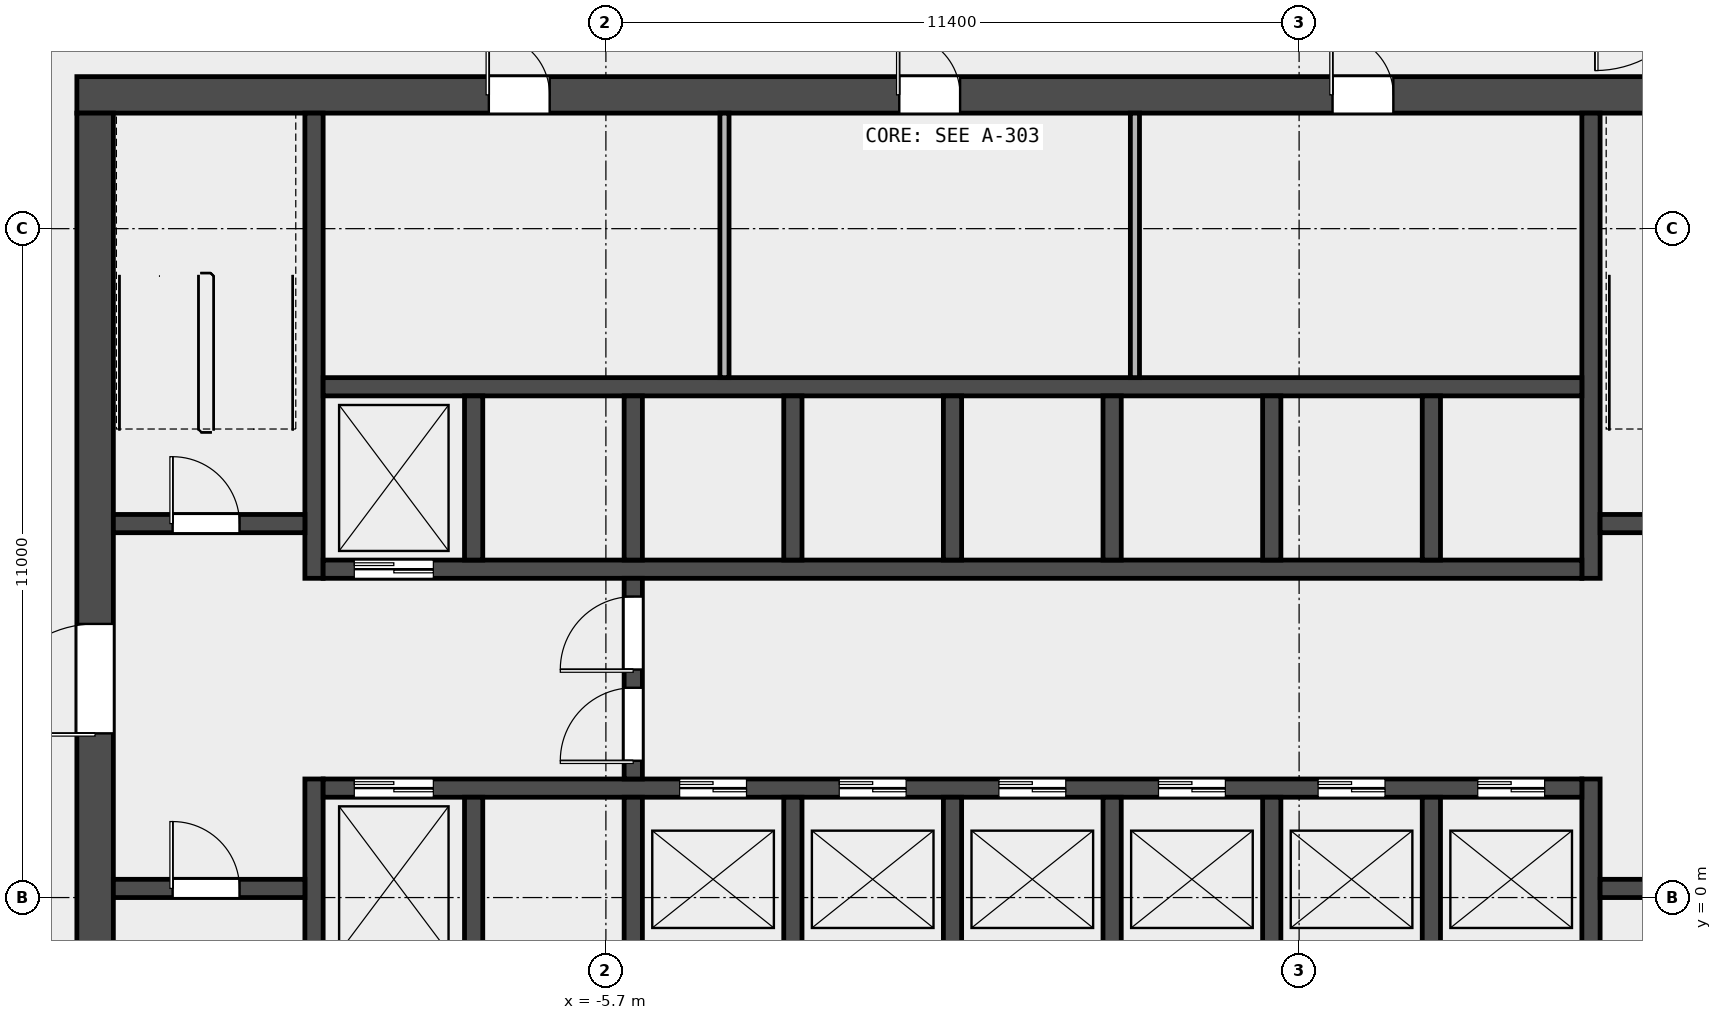
"""IFC4 building model, lengths in metres.
Left out: names, types, materials, properties, quantities, classifications, styles, units other than length and angle.
Written with IfcOpenShell. Run it as: python <this file> out.ifc"""

import sys

from ifc_helpers import new_model, si_unit, direction, frame, frame_2d, origin, place, context, subcontext, project, spatial, rectangle, extrude, element, fill, save


model = new_model("IFC4")
c1 = context("Model", 3, precision=1e-05, world=origin(), true_north=direction((0.0, 1.0)))
c2 = subcontext(c1, "Body", "Model", "MODEL_VIEW")
j1 = project(units=[si_unit("LENGTHUNIT", "METRE"), si_unit("PLANEANGLEUNIT", "RADIAN")], contexts=[c1])
p1 = place(None, origin())
s1 = spatial("IfcSite", under=j1, at=p1, CompositionType="ELEMENT")
p2 = place(p1, origin())
s2 = spatial("IfcBuilding", under=s1, at=p2, CompositionType="ELEMENT")
p3 = place(p2, frame((0.0, 0.0, 20.0)))
s3 = spatial("IfcBuildingStorey", under=s2, at=p3, CompositionType="ELEMENT", Elevation=20.0)
p4 = place(p3, frame((-14.4, 13.2, 0.0), z_axis=(0.0, 0.0, 1.0), x_axis=(1.0, 0.0, 0.0)))
e1 = element("IfcWall", 1, at=p4, inside=s3, PredefinedType="SHEAR", context=c2, shape_type="SweptSolid", body=[
    extrude(rectangle(XDim=28.8, YDim=0.6, at=frame_2d((14.4, 0.0))), origin(), (0.0, 0.0, 1.0), 5.2),
])
p5 = place(p4, frame((6.775, 0.0, 0.0)))
e2 = element("IfcOpeningElement", 2, at=p5, cuts=e1, PredefinedType="OPENING", context=c2, shape_type="SweptSolid", body=[
    extrude(rectangle(XDim=1.0, YDim=2.1, at=frame_2d((0.5, 1.05))), frame((0.0, 0.312, 0.0), z_axis=(0.0, -1.0, 0.0), x_axis=(1.0, 0.0, 0.0)), (0.0, 0.0, 1.0), 0.624),
])
p6 = place(p4, frame((13.525, 0.0, 0.0)))
e3 = element("IfcOpeningElement", 3, at=p6, cuts=e1, PredefinedType="OPENING", context=c2, shape_type="SweptSolid", body=[
    extrude(rectangle(XDim=1.0, YDim=2.1, at=frame_2d((0.5, 1.05))), frame((0.0, 0.312, 0.0), z_axis=(0.0, -1.0, 0.0), x_axis=(1.0, 0.0, 0.0)), (0.0, 0.0, 1.0), 0.624),
])
p7 = place(p4, frame((20.65, 0.0, 0.0)))
e4 = element("IfcOpeningElement", 4, at=p7, cuts=e1, PredefinedType="OPENING", context=c2, shape_type="SweptSolid", body=[
    extrude(rectangle(XDim=1.0, YDim=2.1, at=frame_2d((0.5, 1.05))), frame((0.0, 0.312, 0.0), z_axis=(0.0, -1.0, 0.0), x_axis=(1.0, 0.0, 0.0)), (0.0, 0.0, 1.0), 0.624),
])
p8 = place(p3, frame((-14.1, -6.6, 0.0), z_axis=(0.0, 0.0, 1.0), x_axis=(0.0, 1.0, 0.0)))
e5 = element("IfcWall", 5, at=p8, inside=s3, PredefinedType="SHEAR", context=c2, shape_type="SweptSolid", body=[
    extrude(rectangle(XDim=19.5, YDim=0.6, at=frame_2d((9.75, 0.0))), origin(), (0.0, 0.0, 1.0), 5.2),
])
p9 = place(p8, frame((9.3, 0.0, 0.0)))
e6 = element("IfcOpeningElement", 6, at=p9, cuts=e5, PredefinedType="OPENING", context=c2, shape_type="SweptSolid", body=[
    extrude(rectangle(XDim=1.8, YDim=2.1, at=frame_2d((0.9, 1.05))), frame((0.0, 0.312, 0.0), z_axis=(0.0, -1.0, 0.0), x_axis=(1.0, 0.0, 0.0)), (0.0, 0.0, 1.0), 0.624),
])
p10 = place(p3, frame((-10.5, -6.6, 0.0), z_axis=(0.0, 0.0, 1.0), x_axis=(0.0, 1.0, 0.0)))
e7 = element("IfcWall", 7, at=p10, inside=s3, PredefinedType="SHEAR", context=c2, shape_type="SweptSolid", body=[
    extrude(rectangle(XDim=8.55, YDim=0.3, at=frame_2d((4.275, 0.0))), origin(), (0.0, 0.0, 1.0), 5.2),
])
p11 = place(p3, frame((-10.5, 5.25, 0.0), z_axis=(0.0, 0.0, 1.0), x_axis=(0.0, 1.0, 0.0)))
e8 = element("IfcWall", 8, at=p11, inside=s3, PredefinedType="SHEAR", context=c2, shape_type="SweptSolid", body=[
    extrude(rectangle(XDim=7.65, YDim=0.3, at=frame_2d((3.825, 0.0))), origin(), (0.0, 0.0, 1.0), 5.2),
])
p12 = place(p3, frame((10.5, -6.6, 0.0), z_axis=(0.0, 0.0, 1.0), x_axis=(0.0, 1.0, 0.0)))
e9 = element("IfcWall", 9, at=p12, inside=s3, PredefinedType="SHEAR", context=c2, shape_type="SweptSolid", body=[
    extrude(rectangle(XDim=8.55, YDim=0.3, at=frame_2d((4.275, 0.0))), origin(), (0.0, 0.0, 1.0), 5.2),
])
p13 = place(p3, frame((10.5, 5.25, 0.0), z_axis=(0.0, 0.0, 1.0), x_axis=(0.0, 1.0, 0.0)))
e10 = element("IfcWall", 10, at=p13, inside=s3, PredefinedType="SHEAR", context=c2, shape_type="SweptSolid", body=[
    extrude(rectangle(XDim=7.65, YDim=0.3, at=frame_2d((3.825, 0.0))), origin(), (0.0, 0.0, 1.0), 5.2),
])
p14 = place(p3, frame((-13.8, 0.15, 0.0), z_axis=(0.0, 0.0, 1.0), x_axis=(1.0, 0.0, 0.0)))
e11 = element("IfcWall", 11, at=p14, inside=s3, PredefinedType="SOLIDWALL", context=c2, shape_type="SweptSolid", body=[
    extrude(rectangle(XDim=3.15, YDim=0.3, at=frame_2d((1.575, 0.0))), origin(), (0.0, 0.0, 1.0), 5.2),
])
p15 = place(p14, frame((0.975, 0.0, 0.0)))
e12 = element("IfcOpeningElement", 12, at=p15, cuts=e11, PredefinedType="OPENING", context=c2, shape_type="SweptSolid", body=[
    extrude(rectangle(XDim=1.1, YDim=2.1, at=frame_2d((0.55, 1.05))), frame((0.0, 0.162, 0.0), z_axis=(0.0, -1.0, 0.0), x_axis=(1.0, 0.0, 0.0)), (0.0, 0.0, 1.0), 0.324),
])
p16 = place(p3, frame((-13.8, 6.15, 0.0), z_axis=(0.0, 0.0, 1.0), x_axis=(1.0, 0.0, 0.0)))
e13 = element("IfcWall", 13, at=p16, inside=s3, PredefinedType="SOLIDWALL", context=c2, shape_type="SweptSolid", body=[
    extrude(rectangle(XDim=3.15, YDim=0.3, at=frame_2d((1.575, 0.0))), origin(), (0.0, 0.0, 1.0), 5.2),
])
p17 = place(p16, frame((0.975, 0.0, 0.0)))
e14 = element("IfcOpeningElement", 14, at=p17, cuts=e13, PredefinedType="OPENING", context=c2, shape_type="SweptSolid", body=[
    extrude(rectangle(XDim=1.1, YDim=2.1, at=frame_2d((0.55, 1.05))), frame((0.0, 0.162, 0.0), z_axis=(0.0, -1.0, 0.0), x_axis=(1.0, 0.0, 0.0)), (0.0, 0.0, 1.0), 0.324),
])
p18 = place(p3, frame((10.65, 0.15, 0.0), z_axis=(0.0, 0.0, 1.0), x_axis=(1.0, 0.0, 0.0)))
e15 = element("IfcWall", 15, at=p18, inside=s3, PredefinedType="SOLIDWALL", context=c2, shape_type="SweptSolid", body=[
    extrude(rectangle(XDim=3.15, YDim=0.3, at=frame_2d((1.575, 0.0))), origin(), (0.0, 0.0, 1.0), 5.2),
])
p19 = place(p18, frame((1.025, 0.0, 0.0)))
e16 = element("IfcOpeningElement", 16, at=p19, cuts=e15, PredefinedType="OPENING", context=c2, shape_type="SweptSolid", body=[
    extrude(rectangle(XDim=1.1, YDim=2.1, at=frame_2d((0.55, 1.05))), frame((0.0, 0.162, 0.0), z_axis=(0.0, -1.0, 0.0), x_axis=(1.0, 0.0, 0.0)), (0.0, 0.0, 1.0), 0.324),
])
p20 = place(p3, frame((10.65, 6.15, 0.0), z_axis=(0.0, 0.0, 1.0), x_axis=(1.0, 0.0, 0.0)))
e17 = element("IfcWall", 17, at=p20, inside=s3, PredefinedType="SOLIDWALL", context=c2, shape_type="SweptSolid", body=[
    extrude(rectangle(XDim=3.15, YDim=0.3, at=frame_2d((1.575, 0.0))), origin(), (0.0, 0.0, 1.0), 5.2),
])
p21 = place(p20, frame((1.025, 0.0, 0.0)))
e18 = element("IfcOpeningElement", 18, at=p21, cuts=e17, PredefinedType="OPENING", context=c2, shape_type="SweptSolid", body=[
    extrude(rectangle(XDim=1.1, YDim=2.1, at=frame_2d((0.55, 1.05))), frame((0.0, 0.162, 0.0), z_axis=(0.0, -1.0, 0.0), x_axis=(1.0, 0.0, 0.0)), (0.0, 0.0, 1.0), 0.324),
])
p22 = place(p3, frame((-10.35, 1.8, 0.0), z_axis=(0.0, 0.0, 1.0), x_axis=(1.0, 0.0, 0.0)))
e19 = element("IfcWall", 19, at=p22, inside=s3, PredefinedType="SOLIDWALL", context=c2, shape_type="SweptSolid", body=[
    extrude(rectangle(XDim=20.7, YDim=0.3, at=frame_2d((10.35, 0.0))), origin(), (0.0, 0.0, 1.0), 5.2),
])
p23 = place(p22, frame((0.512, 0.0, 0.0)))
e20 = element("IfcOpeningElement", 20, at=p23, cuts=e19, PredefinedType="OPENING", context=c2, shape_type="SweptSolid", body=[
    extrude(rectangle(XDim=1.3, YDim=2.1, at=frame_2d((0.65, 1.05))), frame((0.0, 0.162, 0.0), z_axis=(0.0, -1.0, 0.0), x_axis=(1.0, 0.0, 0.0)), (0.0, 0.0, 1.0), 0.324),
])
p24 = place(p22, frame((5.863, 0.0, 0.0)))
e21 = element("IfcOpeningElement", 21, at=p24, cuts=e19, PredefinedType="OPENING", context=c2, shape_type="SweptSolid", body=[
    extrude(rectangle(XDim=1.1, YDim=2.1, at=frame_2d((0.55, 1.05))), frame((0.0, 0.162, 0.0), z_axis=(0.0, -1.0, 0.0), x_axis=(1.0, 0.0, 0.0)), (0.0, 0.0, 1.0), 0.324),
])
p25 = place(p22, frame((8.488, 0.0, 0.0)))
e22 = element("IfcOpeningElement", 22, at=p25, cuts=e19, PredefinedType="OPENING", context=c2, shape_type="SweptSolid", body=[
    extrude(rectangle(XDim=1.1, YDim=2.1, at=frame_2d((0.55, 1.05))), frame((0.0, 0.162, 0.0), z_axis=(0.0, -1.0, 0.0), x_axis=(1.0, 0.0, 0.0)), (0.0, 0.0, 1.0), 0.324),
])
p26 = place(p22, frame((11.113, 0.0, 0.0)))
e23 = element("IfcOpeningElement", 23, at=p26, cuts=e19, PredefinedType="OPENING", context=c2, shape_type="SweptSolid", body=[
    extrude(rectangle(XDim=1.1, YDim=2.1, at=frame_2d((0.55, 1.05))), frame((0.0, 0.162, 0.0), z_axis=(0.0, -1.0, 0.0), x_axis=(1.0, 0.0, 0.0)), (0.0, 0.0, 1.0), 0.324),
])
p27 = place(p22, frame((13.738, 0.0, 0.0)))
e24 = element("IfcOpeningElement", 24, at=p27, cuts=e19, PredefinedType="OPENING", context=c2, shape_type="SweptSolid", body=[
    extrude(rectangle(XDim=1.1, YDim=2.1, at=frame_2d((0.55, 1.05))), frame((0.0, 0.162, 0.0), z_axis=(0.0, -1.0, 0.0), x_axis=(1.0, 0.0, 0.0)), (0.0, 0.0, 1.0), 0.324),
])
p28 = place(p22, frame((16.363, 0.0, 0.0)))
e25 = element("IfcOpeningElement", 25, at=p28, cuts=e19, PredefinedType="OPENING", context=c2, shape_type="SweptSolid", body=[
    extrude(rectangle(XDim=1.1, YDim=2.1, at=frame_2d((0.55, 1.05))), frame((0.0, 0.162, 0.0), z_axis=(0.0, -1.0, 0.0), x_axis=(1.0, 0.0, 0.0)), (0.0, 0.0, 1.0), 0.324),
])
p29 = place(p22, frame((18.988, 0.0, 0.0)))
e26 = element("IfcOpeningElement", 26, at=p29, cuts=e19, PredefinedType="OPENING", context=c2, shape_type="SweptSolid", body=[
    extrude(rectangle(XDim=1.1, YDim=2.1, at=frame_2d((0.55, 1.05))), frame((0.0, 0.162, 0.0), z_axis=(0.0, -1.0, 0.0), x_axis=(1.0, 0.0, 0.0)), (0.0, 0.0, 1.0), 0.324),
])
p30 = place(p3, frame((-10.35, 5.4, 0.0), z_axis=(0.0, 0.0, 1.0), x_axis=(1.0, 0.0, 0.0)))
e27 = element("IfcWall", 27, at=p30, inside=s3, PredefinedType="SOLIDWALL", context=c2, shape_type="SweptSolid", body=[
    extrude(rectangle(XDim=20.7, YDim=0.3, at=frame_2d((10.35, 0.0))), origin(), (0.0, 0.0, 1.0), 5.2),
])
p31 = place(p30, frame((0.512, 0.0, 0.0)))
e28 = element("IfcOpeningElement", 28, at=p31, cuts=e27, PredefinedType="OPENING", context=c2, shape_type="SweptSolid", body=[
    extrude(rectangle(XDim=1.3, YDim=2.1, at=frame_2d((0.65, 1.05))), frame((0.0, 0.162, 0.0), z_axis=(0.0, -1.0, 0.0), x_axis=(1.0, 0.0, 0.0)), (0.0, 0.0, 1.0), 0.324),
])
p32 = place(p3, frame((-10.35, 8.4, 0.0), z_axis=(0.0, 0.0, 1.0), x_axis=(1.0, 0.0, 0.0)))
e29 = element("IfcWall", 29, at=p32, inside=s3, PredefinedType="SOLIDWALL", context=c2, shape_type="SweptSolid", body=[
    extrude(rectangle(XDim=20.7, YDim=0.3, at=frame_2d((10.35, 0.0))), origin(), (0.0, 0.0, 1.0), 5.2),
])
for number, where, z_axis, x_axis in (
    (30, (-7.875, -1.05, 0.0), (0.0, 0.0, 1.0), (0.0, 1.0, 0.0)),
    (31, (-5.25, -1.05, 0.0), (0.0, 0.0, 1.0), (0.0, 1.0, 0.0)),
    (32, (-2.625, -1.05, 0.0), (0.0, 0.0, 1.0), (0.0, 1.0, 0.0)),
    (33, (0.0, -1.05, 0.0), (0.0, 0.0, 1.0), (0.0, 1.0, 0.0)),
    (34, (2.625, -1.05, 0.0), (0.0, 0.0, 1.0), (0.0, 1.0, 0.0)),
    (35, (5.25, -1.05, 0.0), (0.0, 0.0, 1.0), (0.0, 1.0, 0.0)),
    (36, (7.875, -1.05, 0.0), (0.0, 0.0, 1.0), (0.0, 1.0, 0.0)),
    (37, (-7.875, 5.55, 0.0), (0.0, 0.0, 1.0), (0.0, 1.0, 0.0)),
    (38, (-5.25, 5.55, 0.0), (0.0, 0.0, 1.0), (0.0, 1.0, 0.0)),
    (39, (-2.625, 5.55, 0.0), (0.0, 0.0, 1.0), (0.0, 1.0, 0.0)),
    (40, (0.0, 5.55, 0.0), (0.0, 0.0, 1.0), (0.0, 1.0, 0.0)),
    (41, (2.625, 5.55, 0.0), (0.0, 0.0, 1.0), (0.0, 1.0, 0.0)),
    (42, (5.25, 5.55, 0.0), (0.0, 0.0, 1.0), (0.0, 1.0, 0.0)),
    (43, (7.875, 5.55, 0.0), (0.0, 0.0, 1.0), (0.0, 1.0, 0.0)),
):
    element("IfcWall", number, at=place(p3, frame(where, z_axis=z_axis, x_axis=x_axis)), inside=s3, PredefinedType="SOLIDWALL", context=c2, shape_type="SweptSolid", body=[
        extrude(rectangle(XDim=2.7, YDim=0.3, at=frame_2d((1.35, 0.0))), origin(), (0.0, 0.0, 1.0), 5.2),
    ])
p33 = place(p3, frame((-5.25, 1.95, 0.0), z_axis=(0.0, 0.0, 1.0), x_axis=(0.0, 1.0, 0.0)))
e44 = element("IfcWall", 44, at=p33, inside=s3, PredefinedType="SOLIDWALL", context=c2, shape_type="SweptSolid", body=[
    extrude(rectangle(XDim=3.3, YDim=0.3, at=frame_2d((1.65, 0.0))), origin(), (0.0, 0.0, 1.0), 5.2),
])
p34 = place(p33, frame((0.3, 0.0, 0.0)))
e45 = element("IfcOpeningElement", 45, at=p34, cuts=e44, PredefinedType="OPENING", context=c2, shape_type="SweptSolid", body=[
    extrude(rectangle(XDim=1.2, YDim=2.1, at=frame_2d((0.6, 1.05))), frame((0.0, 0.162, 0.0), z_axis=(0.0, -1.0, 0.0), x_axis=(1.0, 0.0, 0.0)), (0.0, 0.0, 1.0), 0.324),
])
p35 = place(p33, frame((1.8, 0.0, 0.0)))
e46 = element("IfcOpeningElement", 46, at=p35, cuts=e44, PredefinedType="OPENING", context=c2, shape_type="SweptSolid", body=[
    extrude(rectangle(XDim=1.2, YDim=2.1, at=frame_2d((0.6, 1.05))), frame((0.0, 0.162, 0.0), z_axis=(0.0, -1.0, 0.0), x_axis=(1.0, 0.0, 0.0)), (0.0, 0.0, 1.0), 0.324),
])
for number, where, z_axis, x_axis in (
    (47, (-3.75, 8.55, 0.0), (0.0, 0.0, 1.0), (0.0, 1.0, 0.0)),
    (48, (3.0, 8.55, 0.0), (0.0, 0.0, 1.0), (0.0, 1.0, 0.0)),
):
    element("IfcWall", number, at=place(p3, frame(where, z_axis=z_axis, x_axis=x_axis)), inside=s3, PredefinedType="PARTITIONING", context=c2, shape_type="SweptSolid", body=[
        extrude(rectangle(XDim=4.35, YDim=0.15, at=frame_2d((2.175, 0.0))), origin(), (0.0, 0.0, 1.0), 5.2),
    ])
p36 = place(p15, origin())
e49 = element("IfcDoor", 49, at=p36, inside=s3, OperationType="SINGLE_SWING_LEFT", PredefinedType="DOOR", context=c2, shape_type="SweptSolid", body=[
    extrude(rectangle(XDim=1.1, YDim=2.1, at=frame_2d((0.55, 1.05))), frame((0.0, 0.025, 0.0), z_axis=(0.0, -1.0, 0.0), x_axis=(1.0, 0.0, 0.0)), (0.0, 0.0, 1.0), 0.05),
])
fill(e12, e49)
p37 = place(p17, origin())
e50 = element("IfcDoor", 50, at=p37, inside=s3, OperationType="SINGLE_SWING_LEFT", PredefinedType="DOOR", context=c2, shape_type="SweptSolid", body=[
    extrude(rectangle(XDim=1.1, YDim=2.1, at=frame_2d((0.55, 1.05))), frame((0.0, 0.025, 0.0), z_axis=(0.0, -1.0, 0.0), x_axis=(1.0, 0.0, 0.0)), (0.0, 0.0, 1.0), 0.05),
])
fill(e14, e50)
p38 = place(p9, origin())
e51 = element("IfcDoor", 51, at=p38, inside=s3, OperationType="DOUBLE_DOOR_SINGLE_SWING", PredefinedType="DOOR", context=c2, shape_type="SweptSolid", body=[
    extrude(rectangle(XDim=1.8, YDim=2.1, at=frame_2d((0.9, 1.05))), frame((0.0, 0.025, 0.0), z_axis=(0.0, -1.0, 0.0), x_axis=(1.0, 0.0, 0.0)), (0.0, 0.0, 1.0), 0.05),
])
fill(e6, e51)
p39 = place(p34, origin())
e52 = element("IfcDoor", 52, at=p39, inside=s3, OperationType="SINGLE_SWING_LEFT", PredefinedType="DOOR", context=c2, shape_type="SweptSolid", body=[
    extrude(rectangle(XDim=1.2, YDim=2.1, at=frame_2d((0.6, 1.05))), frame((0.0, 0.025, 0.0), z_axis=(0.0, -1.0, 0.0), x_axis=(1.0, 0.0, 0.0)), (0.0, 0.0, 1.0), 0.05),
])
fill(e45, e52)
p40 = place(p35, origin())
e53 = element("IfcDoor", 53, at=p40, inside=s3, OperationType="SINGLE_SWING_RIGHT", PredefinedType="DOOR", context=c2, shape_type="SweptSolid", body=[
    extrude(rectangle(XDim=1.2, YDim=2.1, at=frame_2d((0.6, 1.05))), frame((0.0, 0.025, 0.0), z_axis=(0.0, -1.0, 0.0), x_axis=(1.0, 0.0, 0.0)), (0.0, 0.0, 1.0), 0.05),
])
fill(e46, e53)
p41 = place(p23, origin())
e54 = element("IfcDoor", 54, at=p41, inside=s3, OperationType="DOUBLE_DOOR_SLIDING", PredefinedType="DOOR", context=c2, shape_type="SweptSolid", body=[
    extrude(rectangle(XDim=1.3, YDim=2.1, at=frame_2d((0.65, 1.05))), frame((0.0, 0.025, 0.0), z_axis=(0.0, -1.0, 0.0), x_axis=(1.0, 0.0, 0.0)), (0.0, 0.0, 1.0), 0.05),
])
fill(e20, e54)
p42 = place(p24, origin())
e55 = element("IfcDoor", 55, at=p42, inside=s3, OperationType="DOUBLE_DOOR_SLIDING", PredefinedType="DOOR", context=c2, shape_type="SweptSolid", body=[
    extrude(rectangle(XDim=1.1, YDim=2.1, at=frame_2d((0.55, 1.05))), frame((0.0, 0.025, 0.0), z_axis=(0.0, -1.0, 0.0), x_axis=(1.0, 0.0, 0.0)), (0.0, 0.0, 1.0), 0.05),
])
fill(e21, e55)
p43 = place(p25, origin())
e56 = element("IfcDoor", 56, at=p43, inside=s3, OperationType="DOUBLE_DOOR_SLIDING", PredefinedType="DOOR", context=c2, shape_type="SweptSolid", body=[
    extrude(rectangle(XDim=1.1, YDim=2.1, at=frame_2d((0.55, 1.05))), frame((0.0, 0.025, 0.0), z_axis=(0.0, -1.0, 0.0), x_axis=(1.0, 0.0, 0.0)), (0.0, 0.0, 1.0), 0.05),
])
fill(e22, e56)
p44 = place(p26, origin())
e57 = element("IfcDoor", 57, at=p44, inside=s3, OperationType="DOUBLE_DOOR_SLIDING", PredefinedType="DOOR", context=c2, shape_type="SweptSolid", body=[
    extrude(rectangle(XDim=1.1, YDim=2.1, at=frame_2d((0.55, 1.05))), frame((0.0, 0.025, 0.0), z_axis=(0.0, -1.0, 0.0), x_axis=(1.0, 0.0, 0.0)), (0.0, 0.0, 1.0), 0.05),
])
fill(e23, e57)
p45 = place(p27, origin())
e58 = element("IfcDoor", 58, at=p45, inside=s3, OperationType="DOUBLE_DOOR_SLIDING", PredefinedType="DOOR", context=c2, shape_type="SweptSolid", body=[
    extrude(rectangle(XDim=1.1, YDim=2.1, at=frame_2d((0.55, 1.05))), frame((0.0, 0.025, 0.0), z_axis=(0.0, -1.0, 0.0), x_axis=(1.0, 0.0, 0.0)), (0.0, 0.0, 1.0), 0.05),
])
fill(e24, e58)
p46 = place(p28, origin())
e59 = element("IfcDoor", 59, at=p46, inside=s3, OperationType="DOUBLE_DOOR_SLIDING", PredefinedType="DOOR", context=c2, shape_type="SweptSolid", body=[
    extrude(rectangle(XDim=1.1, YDim=2.1, at=frame_2d((0.55, 1.05))), frame((0.0, 0.025, 0.0), z_axis=(0.0, -1.0, 0.0), x_axis=(1.0, 0.0, 0.0)), (0.0, 0.0, 1.0), 0.05),
])
fill(e25, e59)
p47 = place(p29, origin())
e60 = element("IfcDoor", 60, at=p47, inside=s3, OperationType="DOUBLE_DOOR_SLIDING", PredefinedType="DOOR", context=c2, shape_type="SweptSolid", body=[
    extrude(rectangle(XDim=1.1, YDim=2.1, at=frame_2d((0.55, 1.05))), frame((0.0, 0.025, 0.0), z_axis=(0.0, -1.0, 0.0), x_axis=(1.0, 0.0, 0.0)), (0.0, 0.0, 1.0), 0.05),
])
fill(e26, e60)
p48 = place(p31, origin())
e61 = element("IfcDoor", 61, at=p48, inside=s3, OperationType="DOUBLE_DOOR_SLIDING", PredefinedType="DOOR", context=c2, shape_type="SweptSolid", body=[
    extrude(rectangle(XDim=1.3, YDim=2.1, at=frame_2d((0.65, 1.05))), frame((0.0, 0.025, 0.0), z_axis=(0.0, -1.0, 0.0), x_axis=(1.0, 0.0, 0.0)), (0.0, 0.0, 1.0), 0.05),
])
fill(e28, e61)
p49 = place(p5, origin())
e62 = element("IfcDoor", 62, at=p49, inside=s3, OperationType="SINGLE_SWING_LEFT", PredefinedType="DOOR", context=c2, shape_type="SweptSolid", body=[
    extrude(rectangle(XDim=1.0, YDim=2.1, at=frame_2d((0.5, 1.05))), frame((0.0, 0.025, 0.0), z_axis=(0.0, -1.0, 0.0), x_axis=(1.0, 0.0, 0.0)), (0.0, 0.0, 1.0), 0.05),
])
fill(e2, e62)
p50 = place(p6, origin())
e63 = element("IfcDoor", 63, at=p50, inside=s3, OperationType="SINGLE_SWING_LEFT", PredefinedType="DOOR", context=c2, shape_type="SweptSolid", body=[
    extrude(rectangle(XDim=1.0, YDim=2.1, at=frame_2d((0.5, 1.05))), frame((0.0, 0.025, 0.0), z_axis=(0.0, -1.0, 0.0), x_axis=(1.0, 0.0, 0.0)), (0.0, 0.0, 1.0), 0.05),
])
fill(e3, e63)
p51 = place(p7, origin())
e64 = element("IfcDoor", 64, at=p51, inside=s3, OperationType="SINGLE_SWING_LEFT", PredefinedType="DOOR", context=c2, shape_type="SweptSolid", body=[
    extrude(rectangle(XDim=1.0, YDim=2.1, at=frame_2d((0.5, 1.05))), frame((0.0, 0.025, 0.0), z_axis=(0.0, -1.0, 0.0), x_axis=(1.0, 0.0, 0.0)), (0.0, 0.0, 1.0), 0.05),
])
fill(e4, e64)
save(model, sys.argv[1])
